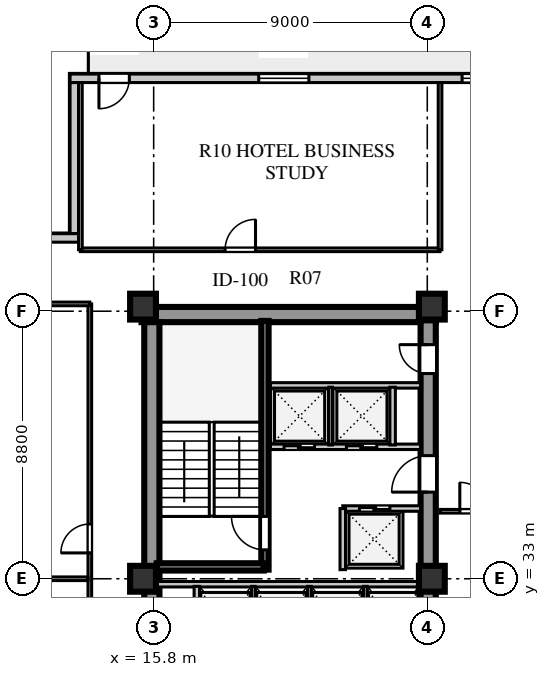
"""IFC4 building model, lengths in metres.
Left out: names, types, materials, properties, quantities, classifications, styles, units other than length and angle.
Written with IfcOpenShell. Run it as: python <this file> out.ifc"""

import sys

from ifc_helpers import new_model, si_unit, direction, frame, frame_2d, origin, origin_2d, place, context, subcontext, project, spatial, rectangle, extrude, element, fill, save


model = new_model("IFC4")
c1 = context("Model", 3, precision=1e-05, world=origin(), true_north=direction((0.0, 1.0)))
c2 = subcontext(c1, "Body", "Model", "MODEL_VIEW")
j1 = project(units=[si_unit("LENGTHUNIT", "METRE"), si_unit("PLANEANGLEUNIT", "RADIAN")], contexts=[c1])
p1 = place(None, origin())
s1 = spatial("IfcSite", under=j1, at=p1, CompositionType="ELEMENT")
p2 = place(p1, origin())
s2 = spatial("IfcBuilding", under=s1, at=p2, CompositionType="ELEMENT")
p3 = place(p2, frame((0.0, 0.0, 173.3)))
s3 = spatial("IfcBuildingStorey", under=s2, at=p3, CompositionType="ELEMENT", Elevation=173.3)
p4 = place(p3, frame((15.4, 41.69, 0.0), z_axis=(0.0, 0.0, 1.0), x_axis=(1.0, 0.0, 0.0)))
e1 = element("IfcWall", 1, at=p4, inside=s3, PredefinedType="SHEAR", context=c2, shape_type="SweptSolid", body=[
    extrude(rectangle(XDim=9.68, YDim=0.5, at=frame_2d((4.84, 0.0))), origin(), (0.0, 0.0, 1.0), 3.6),
])
p5 = place(p3, frame((15.74, 15.81, 0.0), z_axis=(0.0, 0.0, 1.0), x_axis=(0.0, 1.0, 0.0)))
e2 = element("IfcWall", 2, at=p5, inside=s3, PredefinedType="SHEAR", context=c2, shape_type="SweptSolid", body=[
    extrude(rectangle(XDim=25.63, YDim=0.5, at=frame_2d((12.815, 0.0))), origin(), (0.0, 0.0, 1.0), 3.6),
])
p6 = place(p3, frame((24.83, 15.74, 0.0), z_axis=(0.0, 0.0, 1.0), x_axis=(0.0, 1.0, 0.0)))
e3 = element("IfcWall", 3, at=p6, inside=s3, PredefinedType="SHEAR", context=c2, shape_type="SweptSolid", body=[
    extrude(rectangle(XDim=25.76, YDim=0.5, at=frame_2d((12.88, 0.0))), origin(), (0.0, 0.0, 1.0), 3.6),
])
p7 = place(p6, frame((1.61, 0.0, 0.0)))
e4 = element("IfcOpeningElement", 4, at=p7, cuts=e3, PredefinedType="OPENING", context=c2, shape_type="SweptSolid", body=[
    extrude(rectangle(XDim=1.2, YDim=2.1, at=frame_2d((0.6, 1.05))), frame((0.0, 0.26, 0.0), z_axis=(0.0, -1.0, 0.0), x_axis=(1.0, 0.0, 0.0)), (0.0, 0.0, 1.0), 0.52),
])
p8 = place(p6, frame((6.78, 0.0, 0.0)))
e5 = element("IfcOpeningElement", 5, at=p8, cuts=e3, PredefinedType="OPENING", context=c2, shape_type="SweptSolid", body=[
    extrude(rectangle(XDim=0.85, YDim=2.06, at=frame_2d((0.425, 1.03))), frame((0.0, 0.26, 0.0), z_axis=(0.0, -1.0, 0.0), x_axis=(1.0, 0.0, 0.0)), (0.0, 0.0, 1.0), 0.52),
])
p9 = place(p6, frame((12.11, 0.0, 0.0)))
e6 = element("IfcOpeningElement", 6, at=p9, cuts=e3, PredefinedType="OPENING", context=c2, shape_type="SweptSolid", body=[
    extrude(rectangle(XDim=1.5, YDim=2.12, at=frame_2d((0.75, 1.06))), frame((0.0, 0.26, 0.0), z_axis=(0.0, -1.0, 0.0), x_axis=(1.0, 0.0, 0.0)), (0.0, 0.0, 1.0), 0.52),
])
p10 = place(p6, frame((20.11, 0.0, 0.0)))
e7 = element("IfcOpeningElement", 7, at=p10, cuts=e3, PredefinedType="OPENING", context=c2, shape_type="SweptSolid", body=[
    extrude(rectangle(XDim=1.2, YDim=2.12, at=frame_2d((0.6, 1.06))), frame((0.0, 0.26, 0.0), z_axis=(0.0, -1.0, 0.0), x_axis=(1.0, 0.0, 0.0)), (0.0, 0.0, 1.0), 0.52),
])
p11 = place(p6, frame((24.01, 0.0, 0.0)))
e8 = element("IfcOpeningElement", 8, at=p11, cuts=e3, PredefinedType="OPENING", context=c2, shape_type="SweptSolid", body=[
    extrude(rectangle(XDim=0.95, YDim=2.1, at=frame_2d((0.475, 1.05))), frame((0.0, 0.26, 0.0), z_axis=(0.0, -1.0, 0.0), x_axis=(1.0, 0.0, 0.0)), (0.0, 0.0, 1.0), 0.52),
])
for number, where, z_axis, x_axis in (
    (9, (15.45, 33.0, 0.0), (0.0, 0.0, 1.0), (1.0, 0.0, 0.0)),
    (10, (15.45, 41.95, 0.0), (0.0, 0.0, 1.0), (1.0, 0.0, 0.0)),
    (11, (24.95, 33.0, 0.0), (0.0, 0.0, 1.0), (1.0, 0.0, 0.0)),
    (12, (24.95, 41.95, 0.0), (0.0, 0.0, 1.0), (1.0, 0.0, 0.0)),
):
    element("IfcColumn", number, at=place(p3, frame(where, z_axis=z_axis, x_axis=x_axis)), inside=s3, PredefinedType="COLUMN", context=c2, shape_type="SweptSolid", body=[
        extrude(rectangle(XDim=0.85, YDim=0.85, at=origin_2d()), origin(), (0.0, 0.0, 1.0), 3.6),
    ])
p12 = place(p3, frame((45.55, 49.46, 0.0), z_axis=(0.0, 0.0, 1.0), x_axis=(-1.0, 0.0, 0.0)))
e13 = element("IfcWall", 13, at=p12, inside=s3, PredefinedType="STANDARD", context=c2, shape_type="SweptSolid", body=[
    extrude(rectangle(XDim=32.5, YDim=0.28, at=frame_2d((16.25, 0.0))), origin(), (0.0, 0.0, 1.0), 3.6),
])
p13 = place(p12, frame((30.55, 0.0, 0.0)))
e14 = element("IfcOpeningElement", 14, at=p13, cuts=e13, PredefinedType="OPENING", context=c2, shape_type="SweptSolid", body=[
    extrude(rectangle(XDim=1.0, YDim=2.05, at=frame_2d((0.5, 1.025))), frame((0.0, 0.15, 0.0), z_axis=(0.0, -1.0, 0.0), x_axis=(1.0, 0.0, 0.0)), (0.0, 0.0, 1.0), 0.3),
])
p14 = place(p12, frame((24.645, 0.0, 0.8)))
e15 = element("IfcOpeningElement", 15, at=p14, cuts=e13, PredefinedType="OPENING", context=c2, shape_type="SweptSolid", body=[
    extrude(rectangle(XDim=1.65, YDim=1.95, at=frame_2d((0.825, 0.975))), frame((0.0, 0.15, 0.0), z_axis=(0.0, -1.0, 0.0), x_axis=(1.0, 0.0, 0.0)), (0.0, 0.0, 1.0), 0.3),
])
p15 = place(p12, frame((18.405, 0.0, 0.8)))
e16 = element("IfcOpeningElement", 16, at=p15, cuts=e13, PredefinedType="OPENING", context=c2, shape_type="SweptSolid", body=[
    extrude(rectangle(XDim=1.2, YDim=1.75, at=frame_2d((0.6, 0.875))), frame((0.0, 0.15, 0.0), z_axis=(0.0, -1.0, 0.0), x_axis=(1.0, 0.0, 0.0)), (0.0, 0.0, 1.0), 0.3),
])
p16 = place(p12, frame((16.015, 0.0, 0.8)))
e17 = element("IfcOpeningElement", 17, at=p16, cuts=e13, PredefinedType="OPENING", context=c2, shape_type="SweptSolid", body=[
    extrude(rectangle(XDim=1.2, YDim=1.75, at=frame_2d((0.6, 0.875))), frame((0.0, 0.15, 0.0), z_axis=(0.0, -1.0, 0.0), x_axis=(1.0, 0.0, 0.0)), (0.0, 0.0, 1.0), 0.3),
])
p17 = place(p12, frame((12.29, 0.0, 0.8)))
e18 = element("IfcOpeningElement", 18, at=p17, cuts=e13, PredefinedType="OPENING", context=c2, shape_type="SweptSolid", body=[
    extrude(rectangle(XDim=1.8, YDim=2.0, at=frame_2d((0.9, 1.0))), frame((0.0, 0.15, 0.0), z_axis=(0.0, -1.0, 0.0), x_axis=(1.0, 0.0, 0.0)), (0.0, 0.0, 1.0), 0.3),
])
p18 = place(p12, frame((7.03, 0.0, 0.8)))
e19 = element("IfcOpeningElement", 19, at=p18, cuts=e13, PredefinedType="OPENING", context=c2, shape_type="SweptSolid", body=[
    extrude(rectangle(XDim=1.5, YDim=2.0, at=frame_2d((0.75, 1.0))), frame((0.0, 0.15, 0.0), z_axis=(0.0, -1.0, 0.0), x_axis=(1.0, 0.0, 0.0)), (0.0, 0.0, 1.0), 0.3),
])
p19 = place(p12, frame((1.82, 0.0, 0.8)))
e20 = element("IfcOpeningElement", 20, at=p19, cuts=e13, PredefinedType="OPENING", context=c2, shape_type="SweptSolid", body=[
    extrude(rectangle(XDim=1.2, YDim=1.75, at=frame_2d((0.6, 0.875))), frame((0.0, 0.15, 0.0), z_axis=(0.0, -1.0, 0.0), x_axis=(1.0, 0.0, 0.0)), (0.0, 0.0, 1.0), 0.3),
])
p20 = place(p3, frame((13.19, 49.32, 0.0), z_axis=(0.0, 0.0, 1.0), x_axis=(0.0, -1.0, 0.0)))
e21 = element("IfcWall", 21, at=p20, inside=s3, PredefinedType="STANDARD", context=c2, shape_type="SweptSolid", body=[
    extrude(rectangle(XDim=4.97, YDim=0.28, at=frame_2d((2.485, 0.0))), origin(), (0.0, 0.0, 1.0), 3.6),
])
p21 = place(p3, frame((13.33, 44.21, 0.0), z_axis=(0.0, 0.0, 1.0), x_axis=(-1.0, 0.0, 0.0)))
e22 = element("IfcWall", 22, at=p21, inside=s3, PredefinedType="STANDARD", context=c2, shape_type="SweptSolid", body=[
    extrude(rectangle(XDim=5.53, YDim=0.28, at=frame_2d((2.765, 0.0))), origin(), (0.0, 0.0, 1.0), 3.6),
])
p22 = place(p3, frame((15.9, 32.82, 0.0), z_axis=(0.0, 0.0, 1.0), x_axis=(1.0, 0.0, 0.0)))
e23 = element("IfcWall", 23, at=p22, inside=s3, PredefinedType="SOLIDWALL", context=c2, shape_type="SweptSolid", body=[
    extrude(rectangle(XDim=8.68, YDim=0.18, at=frame_2d((4.34, 0.0))), origin(), (0.0, 0.0, 1.0), 2.95),
])
p23 = place(p3, frame((17.22, 30.7, 0.0), z_axis=(0.0, 0.0, 1.0), x_axis=(0.0, 1.0, 0.0)))
e24 = element("IfcWall", 24, at=p23, inside=s3, PredefinedType="SOLIDWALL", context=c2, shape_type="SweptSolid", body=[
    extrude(rectangle(XDim=2.05, YDim=0.18, at=frame_2d((1.025, 0.0))), origin(), (0.0, 0.0, 1.0), 3.6),
])
for number, where, z_axis, x_axis in (
    (25, (19.08, 30.7, 0.0), (0.0, 0.0, 1.0), (0.0, 1.0, 0.0)),
    (26, (20.92, 30.7, 0.0), (0.0, 0.0, 1.0), (0.0, 1.0, 0.0)),
    (27, (22.76, 30.7, 0.0), (0.0, 0.0, 1.0), (0.0, 1.0, 0.0)),
):
    element("IfcWall", number, at=place(p3, frame(where, z_axis=z_axis, x_axis=x_axis)), inside=s3, PredefinedType="PARTITIONING", context=c2, shape_type="SweptSolid", body=[
        extrude(rectangle(XDim=2.05, YDim=0.12, at=frame_2d((1.025, 0.0))), origin(), (0.0, 0.0, 1.0), 3.6),
    ])
p24 = place(p3, frame((19.46, 33.3, 0.0), z_axis=(0.0, 0.0, 1.0), x_axis=(0.0, 1.0, 0.0)))
e28 = element("IfcWall", 28, at=p24, inside=s3, PredefinedType="SHEAR", context=c2, shape_type="SweptSolid", body=[
    extrude(rectangle(XDim=8.18, YDim=0.24, at=frame_2d((4.09, 0.0))), origin(), (0.0, 0.0, 1.0), 3.85),
])
p25 = place(p24, frame((0.65, 0.0, 0.0)))
e29 = element("IfcOpeningElement", 29, at=p25, cuts=e28, PredefinedType="OPENING", context=c2, shape_type="SweptSolid", body=[
    extrude(rectangle(XDim=1.1, YDim=2.1, at=frame_2d((0.55, 1.05))), frame((0.0, 0.13, 0.0), z_axis=(0.0, -1.0, 0.0), x_axis=(1.0, 0.0, 0.0)), (0.0, 0.0, 1.0), 0.26),
])
p26 = place(p3, frame((15.9, 33.39, 0.0), z_axis=(0.0, 0.0, 1.0), x_axis=(1.0, 0.0, 0.0)))
e30 = element("IfcWall", 30, at=p26, inside=s3, PredefinedType="SHEAR", context=c2, shape_type="SweptSolid", body=[
    extrude(rectangle(XDim=3.52, YDim=0.24, at=frame_2d((1.76, 0.0))), origin(), (0.0, 0.0, 1.0), 3.85),
])
p27 = place(p3, frame((22.02, 35.31, 0.0), z_axis=(0.0, 0.0, 1.0), x_axis=(1.0, 0.0, 0.0)))
e31 = element("IfcWall", 31, at=p27, inside=s3, PredefinedType="SOLIDWALL", context=c2, shape_type="SweptSolid", body=[
    extrude(rectangle(XDim=2.56, YDim=0.18, at=frame_2d((1.28, 0.0))), origin(), (0.0, 0.0, 1.0), 3.6),
])
p28 = place(p27, frame((0.55, 0.0, 0.0)))
e32 = element("IfcOpeningElement", 32, at=p28, cuts=e31, PredefinedType="OPENING", context=c2, shape_type="SweptSolid", body=[
    extrude(rectangle(XDim=1.0, YDim=2.1, at=frame_2d((0.5, 1.05))), frame((0.0, 0.1, 0.0), z_axis=(0.0, -1.0, 0.0), x_axis=(1.0, 0.0, 0.0)), (0.0, 0.0, 1.0), 0.2),
])
p29 = place(p3, frame((22.02, 33.3, 0.0), z_axis=(0.0, 0.0, 1.0), x_axis=(0.0, 1.0, 0.0)))
e33 = element("IfcWall", 33, at=p29, inside=s3, PredefinedType="SOLIDWALL", context=c2, shape_type="SweptSolid", body=[
    extrude(rectangle(XDim=2.01, YDim=0.18, at=frame_2d((1.005, 0.0))), origin(), (0.0, 0.0, 1.0), 3.6),
])
p30 = place(p3, frame((19.64, 37.34, 0.0), z_axis=(0.0, 0.0, 1.0), x_axis=(1.0, 0.0, 0.0)))
e34 = element("IfcWall", 34, at=p30, inside=s3, PredefinedType="SOLIDWALL", context=c2, shape_type="SweptSolid", body=[
    extrude(rectangle(XDim=4.94, YDim=0.18, at=frame_2d((2.47, 0.0))), origin(), (0.0, 0.0, 1.0), 3.6),
])
p31 = place(p30, frame((0.45, 0.0, 0.0)))
e35 = element("IfcOpeningElement", 35, at=p31, cuts=e34, PredefinedType="OPENING", context=c2, shape_type="SweptSolid", body=[
    extrude(rectangle(XDim=1.0, YDim=2.1, at=frame_2d((0.5, 1.05))), frame((0.0, 0.1, 0.0), z_axis=(0.0, -1.0, 0.0), x_axis=(1.0, 0.0, 0.0)), (0.0, 0.0, 1.0), 0.2),
])
p32 = place(p30, frame((2.5, 0.0, 0.0)))
e36 = element("IfcOpeningElement", 36, at=p32, cuts=e34, PredefinedType="OPENING", context=c2, shape_type="SweptSolid", body=[
    extrude(rectangle(XDim=1.0, YDim=2.1, at=frame_2d((0.5, 1.05))), frame((0.0, 0.1, 0.0), z_axis=(0.0, -1.0, 0.0), x_axis=(1.0, 0.0, 0.0)), (0.0, 0.0, 1.0), 0.2),
])
p33 = place(p3, frame((19.64, 39.36, 0.0), z_axis=(0.0, 0.0, 1.0), x_axis=(1.0, 0.0, 0.0)))
e37 = element("IfcWall", 37, at=p33, inside=s3, PredefinedType="SOLIDWALL", context=c2, shape_type="SweptSolid", body=[
    extrude(rectangle(XDim=4.94, YDim=0.18, at=frame_2d((2.47, 0.0))), origin(), (0.0, 0.0, 1.0), 3.6),
])
p34 = place(p3, frame((21.62, 37.4, 0.0), z_axis=(0.0, 0.0, 1.0), x_axis=(0.0, 1.0, 0.0)))
e38 = element("IfcWall", 38, at=p34, inside=s3, PredefinedType="PARTITIONING", context=c2, shape_type="SweptSolid", body=[
    extrude(rectangle(XDim=1.9, YDim=0.12, at=frame_2d((0.95, 0.0))), origin(), (0.0, 0.0, 1.0), 3.6),
])
p35 = place(p3, frame((23.66, 37.4, 0.0), z_axis=(0.0, 0.0, 1.0), x_axis=(0.0, 1.0, 0.0)))
e39 = element("IfcWall", 39, at=p35, inside=s3, PredefinedType="SOLIDWALL", context=c2, shape_type="SweptSolid", body=[
    extrude(rectangle(XDim=1.9, YDim=0.18, at=frame_2d((0.95, 0.0))), origin(), (0.0, 0.0, 1.0), 3.6),
])
p36 = place(p3, frame((25.22, 35.22, 0.0), z_axis=(0.0, 0.0, 1.0), x_axis=(1.0, 0.0, 0.0)))
e40 = element("IfcWall", 40, at=p36, inside=s3, PredefinedType="PARTITIONING", context=c2, shape_type="SweptSolid", body=[
    extrude(rectangle(XDim=9.5, YDim=0.12, at=frame_2d((4.75, 0.0))), origin(), (0.0, 0.0, 1.0), 3.6),
])
p37 = place(p36, frame((0.65, 0.0, 0.0)))
e41 = element("IfcOpeningElement", 41, at=p37, cuts=e40, PredefinedType="OPENING", context=c2, shape_type="SweptSolid", body=[
    extrude(rectangle(XDim=0.95, YDim=2.1, at=frame_2d((0.475, 1.05))), frame((0.0, 0.07, 0.0), z_axis=(0.0, -1.0, 0.0), x_axis=(1.0, 0.0, 0.0)), (0.0, 0.0, 1.0), 0.14),
])
p38 = place(p36, frame((5.4, 0.0, 0.0)))
e42 = element("IfcOpeningElement", 42, at=p38, cuts=e40, PredefinedType="OPENING", context=c2, shape_type="SweptSolid", body=[
    extrude(rectangle(XDim=1.05, YDim=2.1, at=frame_2d((0.525, 1.05))), frame((0.0, 0.07, 0.0), z_axis=(0.0, -1.0, 0.0), x_axis=(1.0, 0.0, 0.0)), (0.0, 0.0, 1.0), 0.14),
])
p39 = place(p3, frame((13.7, 15.16, 0.0), z_axis=(0.0, 0.0, 1.0), x_axis=(0.0, 1.0, 0.0)))
e43 = element("IfcWall", 43, at=p39, inside=s3, PredefinedType="PARTITIONING", context=c2, shape_type="SweptSolid", body=[
    extrude(rectangle(XDim=26.88, YDim=0.12, at=frame_2d((13.44, 0.0))), origin(), (0.0, 0.0, 1.0), 3.6),
])
p40 = place(p39, frame((0.91, 0.0, 0.0)))
e44 = element("IfcOpeningElement", 44, at=p40, cuts=e43, PredefinedType="OPENING", context=c2, shape_type="SweptSolid", body=[
    extrude(rectangle(XDim=0.95, YDim=2.1, at=frame_2d((0.475, 1.05))), frame((0.0, 0.07, 0.0), z_axis=(0.0, -1.0, 0.0), x_axis=(1.0, 0.0, 0.0)), (0.0, 0.0, 1.0), 0.14),
])
p41 = place(p39, frame((9.84, 0.0, 0.0)))
e45 = element("IfcOpeningElement", 45, at=p41, cuts=e43, PredefinedType="OPENING", context=c2, shape_type="SweptSolid", body=[
    extrude(rectangle(XDim=0.95, YDim=2.1, at=frame_2d((0.475, 1.05))), frame((0.0, 0.07, 0.0), z_axis=(0.0, -1.0, 0.0), x_axis=(1.0, 0.0, 0.0)), (0.0, 0.0, 1.0), 0.14),
])
p42 = place(p39, frame((18.69, 0.0, 0.0)))
e46 = element("IfcOpeningElement", 46, at=p42, cuts=e43, PredefinedType="OPENING", context=c2, shape_type="SweptSolid", body=[
    extrude(rectangle(XDim=0.95, YDim=2.1, at=frame_2d((0.475, 1.05))), frame((0.0, 0.07, 0.0), z_axis=(0.0, -1.0, 0.0), x_axis=(1.0, 0.0, 0.0)), (0.0, 0.0, 1.0), 0.14),
])
p43 = place(p3, frame((8.08, 42.04, 0.0), z_axis=(0.0, 0.0, 1.0), x_axis=(1.0, 0.0, 0.0)))
e47 = element("IfcWall", 47, at=p43, inside=s3, PredefinedType="PARTITIONING", context=c2, shape_type="SweptSolid", body=[
    extrude(rectangle(XDim=5.62, YDim=0.12, at=frame_2d((2.81, 0.0))), origin(), (0.0, 0.0, 1.0), 3.15),
])
p44 = place(p3, frame((13.39, 43.82, 0.0), z_axis=(0.0, 0.0, 1.0), x_axis=(1.0, 0.0, 0.0)))
e48 = element("IfcWall", 48, at=p44, inside=s3, PredefinedType="PARTITIONING", context=c2, shape_type="SweptSolid", body=[
    extrude(rectangle(XDim=11.83, YDim=0.12, at=frame_2d((5.915, 0.0))), origin(), (0.0, 0.0, 1.0), 3.6),
])
p45 = place(p44, frame((4.76, 0.0, 0.0)))
e49 = element("IfcOpeningElement", 49, at=p45, cuts=e48, PredefinedType="OPENING", context=c2, shape_type="SweptSolid", body=[
    extrude(rectangle(XDim=1.0, YDim=2.08, at=frame_2d((0.5, 1.04))), frame((0.0, 0.07, 0.0), z_axis=(0.0, -1.0, 0.0), x_axis=(1.0, 0.0, 0.0)), (0.0, 0.0, 1.0), 0.14),
])
p46 = place(p3, frame((13.39, 43.82, 0.0), z_axis=(0.0, 0.0, 1.0), x_axis=(0.0, 1.0, 0.0)))
e50 = element("IfcWall", 50, at=p46, inside=s3, PredefinedType="PARTITIONING", context=c2, shape_type="SweptSolid", body=[
    extrude(rectangle(XDim=5.5, YDim=0.12, at=frame_2d((2.75, 0.0))), origin(), (0.0, 0.0, 1.0), 3.6),
])
p47 = place(p3, frame((25.22, 43.82, 0.0), z_axis=(0.0, 0.0, 1.0), x_axis=(0.0, 1.0, 0.0)))
e51 = element("IfcWall", 51, at=p47, inside=s3, PredefinedType="PARTITIONING", context=c2, shape_type="SweptSolid", body=[
    extrude(rectangle(XDim=5.5, YDim=0.12, at=frame_2d((2.75, 0.0))), origin(), (0.0, 0.0, 1.0), 3.15),
])
p48 = place(p3, frame((8.08, 33.0, 0.0), z_axis=(0.0, 0.0, 1.0), x_axis=(1.0, 0.0, 0.0)))
e52 = element("IfcWall", 52, at=p48, inside=s3, PredefinedType="PARTITIONING", context=c2, shape_type="SweptSolid", body=[
    extrude(rectangle(XDim=5.56, YDim=0.12, at=frame_2d((2.78, 0.0))), origin(), (0.0, 0.0, 1.0), 3.15),
])
p49 = place(p13, frame((1.0, 0.0, 0.0), z_axis=(0.0, 0.0, 1.0), x_axis=(-1.0, 0.0, 0.0)))
e53 = element("IfcDoor", 53, at=p49, inside=s3, OperationType="SINGLE_SWING_LEFT", PredefinedType="DOOR", context=c2, shape_type="SweptSolid", body=[
    extrude(rectangle(XDim=1.0, YDim=2.05, at=frame_2d((0.5, 1.025))), frame((0.0, 0.025, 0.0), z_axis=(0.0, -1.0, 0.0), x_axis=(1.0, 0.0, 0.0)), (0.0, 0.0, 1.0), 0.05),
])
fill(e14, e53)
p50 = place(p14, origin())
e54 = element("IfcWindow", 54, at=p50, inside=s3, PartitioningType="SINGLE_PANEL", PredefinedType="WINDOW", context=c2, shape_type="SweptSolid", body=[
    extrude(rectangle(XDim=1.65, YDim=1.95, at=frame_2d((0.825, 0.975))), frame((0.0, 0.03, 0.0), z_axis=(0.0, -1.0, 0.0), x_axis=(1.0, 0.0, 0.0)), (0.0, 0.0, 1.0), 0.06),
])
fill(e15, e54)
p51 = place(p15, origin())
e55 = element("IfcWindow", 55, at=p51, inside=s3, PartitioningType="SINGLE_PANEL", PredefinedType="WINDOW", context=c2, shape_type="SweptSolid", body=[
    extrude(rectangle(XDim=1.2, YDim=1.75, at=frame_2d((0.6, 0.875))), frame((0.0, 0.03, 0.0), z_axis=(0.0, -1.0, 0.0), x_axis=(1.0, 0.0, 0.0)), (0.0, 0.0, 1.0), 0.06),
])
fill(e16, e55)
p52 = place(p25, origin())
e56 = element("IfcDoor", 56, at=p52, inside=s3, OperationType="SINGLE_SWING_RIGHT", PredefinedType="DOOR", context=c2, shape_type="SweptSolid", body=[
    extrude(rectangle(XDim=1.1, YDim=2.1, at=frame_2d((0.55, 1.05))), frame((0.0, 0.025, 0.0), z_axis=(0.0, -1.0, 0.0), x_axis=(1.0, 0.0, 0.0)), (0.0, 0.0, 1.0), 0.05),
])
fill(e29, e56)
p53 = place(p10, frame((1.2, 0.0, 0.0), z_axis=(0.0, 0.0, 1.0), x_axis=(-1.0, 0.0, 0.0)))
e57 = element("IfcDoor", 57, at=p53, inside=s3, OperationType="SINGLE_SWING_RIGHT", PredefinedType="DOOR", context=c2, shape_type="SweptSolid", body=[
    extrude(rectangle(XDim=1.2, YDim=2.12, at=frame_2d((0.6, 1.06))), frame((0.0, 0.025, 0.0), z_axis=(0.0, -1.0, 0.0), x_axis=(1.0, 0.0, 0.0)), (0.0, 0.0, 1.0), 0.05),
])
fill(e7, e57)
p54 = place(p31, frame((1.0, 0.0, 0.0), z_axis=(0.0, 0.0, 1.0), x_axis=(-1.0, 0.0, 0.0)))
e58 = element("IfcDoor", 58, at=p54, inside=s3, OperationType="DOUBLE_DOOR_SLIDING", PredefinedType="DOOR", context=c2, shape_type="SweptSolid", body=[
    extrude(rectangle(XDim=1.0, YDim=2.1, at=frame_2d((0.5, 1.05))), frame((0.0, 0.025, 0.0), z_axis=(0.0, -1.0, 0.0), x_axis=(1.0, 0.0, 0.0)), (0.0, 0.0, 1.0), 0.05),
])
fill(e35, e58)
p55 = place(p32, frame((1.0, 0.0, 0.0), z_axis=(0.0, 0.0, 1.0), x_axis=(-1.0, 0.0, 0.0)))
e59 = element("IfcDoor", 59, at=p55, inside=s3, OperationType="DOUBLE_DOOR_SLIDING", PredefinedType="DOOR", context=c2, shape_type="SweptSolid", body=[
    extrude(rectangle(XDim=1.0, YDim=2.1, at=frame_2d((0.5, 1.05))), frame((0.0, 0.025, 0.0), z_axis=(0.0, -1.0, 0.0), x_axis=(1.0, 0.0, 0.0)), (0.0, 0.0, 1.0), 0.05),
])
fill(e36, e59)
p56 = place(p28, origin())
e60 = element("IfcDoor", 60, at=p56, inside=s3, OperationType="DOUBLE_DOOR_SLIDING", PredefinedType="DOOR", context=c2, shape_type="SweptSolid", body=[
    extrude(rectangle(XDim=1.0, YDim=2.1, at=frame_2d((0.5, 1.05))), frame((0.0, 0.025, 0.0), z_axis=(0.0, -1.0, 0.0), x_axis=(1.0, 0.0, 0.0)), (0.0, 0.0, 1.0), 0.05),
])
fill(e32, e60)
p57 = place(p11, frame((0.95, 0.0, 0.0), z_axis=(0.0, 0.0, 1.0), x_axis=(-1.0, 0.0, 0.0)))
e61 = element("IfcDoor", 61, at=p57, inside=s3, OperationType="SINGLE_SWING_LEFT", PredefinedType="DOOR", context=c2, shape_type="SweptSolid", body=[
    extrude(rectangle(XDim=0.95, YDim=2.1, at=frame_2d((0.475, 1.05))), frame((0.0, 0.025, 0.0), z_axis=(0.0, -1.0, 0.0), x_axis=(1.0, 0.0, 0.0)), (0.0, 0.0, 1.0), 0.05),
])
fill(e8, e61)
p58 = place(p45, origin())
e62 = element("IfcDoor", 62, at=p58, inside=s3, OperationType="SINGLE_SWING_RIGHT", PredefinedType="DOOR", context=c2, shape_type="SweptSolid", body=[
    extrude(rectangle(XDim=1.0, YDim=2.08, at=frame_2d((0.5, 1.04))), frame((0.0, 0.025, 0.0), z_axis=(0.0, -1.0, 0.0), x_axis=(1.0, 0.0, 0.0)), (0.0, 0.0, 1.0), 0.05),
])
fill(e49, e62)
p59 = place(p42, origin())
e63 = element("IfcDoor", 63, at=p59, inside=s3, OperationType="SINGLE_SWING_LEFT", PredefinedType="DOOR", context=c2, shape_type="SweptSolid", body=[
    extrude(rectangle(XDim=0.95, YDim=2.1, at=frame_2d((0.475, 1.05))), frame((0.0, 0.025, 0.0), z_axis=(0.0, -1.0, 0.0), x_axis=(1.0, 0.0, 0.0)), (0.0, 0.0, 1.0), 0.05),
])
fill(e46, e63)
p60 = place(p37, origin())
e64 = element("IfcDoor", 64, at=p60, inside=s3, OperationType="SINGLE_SWING_LEFT", PredefinedType="DOOR", context=c2, shape_type="SweptSolid", body=[
    extrude(rectangle(XDim=0.95, YDim=2.1, at=frame_2d((0.475, 1.05))), frame((0.0, 0.025, 0.0), z_axis=(0.0, -1.0, 0.0), x_axis=(1.0, 0.0, 0.0)), (0.0, 0.0, 1.0), 0.05),
])
fill(e41, e64)
save(model, sys.argv[1])
